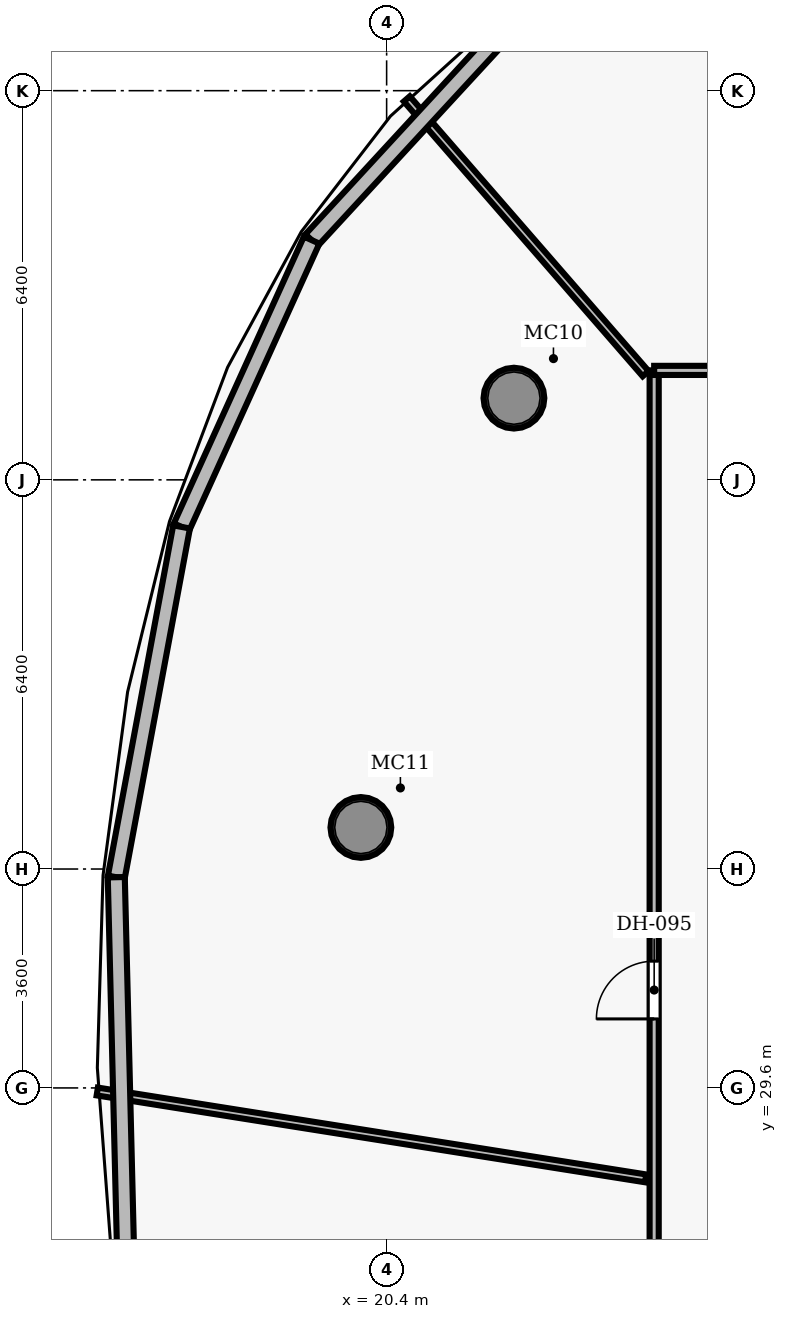
"""IFC4 building model, lengths in metres.
Left out: names, types, materials, properties, quantities, classifications, styles, units other than length and angle.
Written with IfcOpenShell. Run it as: python <this file> out.ifc"""

import sys

from ifc_helpers import new_model, si_unit, direction, frame, frame_2d, origin, origin_2d, place, context, subcontext, project, spatial, rectangle, hollow_circle, extrude, element, fill, save


model = new_model("IFC4")
c1 = context("Model", 3, precision=1e-05, world=origin(), true_north=direction((0.0, 1.0)))
c2 = subcontext(c1, "Body", "Model", "MODEL_VIEW")
j1 = project(units=[si_unit("LENGTHUNIT", "METRE"), si_unit("PLANEANGLEUNIT", "RADIAN")], contexts=[c1])
p1 = place(None, origin())
s1 = spatial("IfcSite", under=j1, at=p1, CompositionType="ELEMENT")
p2 = place(p1, origin())
s2 = spatial("IfcBuilding", under=s1, at=p2, CompositionType="ELEMENT")
p3 = place(p2, frame((0.0, 0.0, 245.9)))
s3 = spatial("IfcBuildingStorey", under=s2, at=p3, CompositionType="ELEMENT", Elevation=245.9)
for number, where, z_axis, x_axis in (
    (1, (22.494, 40.944, 0.0), (0.0, 0.0, 1.0), (1.0, 0.0, 0.0)),
    (2, (19.976, 33.884, 0.0), (0.0, 0.0, 1.0), (1.0, 0.0, 0.0)),
):
    element("IfcColumn", number, at=place(p3, frame(where, z_axis=z_axis, x_axis=x_axis)), inside=s3, PredefinedType="COLUMN", context=c2, shape_type="SweptSolid", body=[
        extrude(hollow_circle(Radius=0.5, WallThickness=0.045, at=origin_2d()), origin(), (0.0, 0.0, 1.0), 3.85),
    ])
p4 = place(p3, frame((24.8, 11.29, 0.0), z_axis=(0.0, 0.0, 1.0), x_axis=(0.0, 1.0, 0.0)))
e3 = element("IfcWall", 3, at=p4, inside=s3, PredefinedType="PARTITIONING", context=c2, shape_type="SweptSolid", body=[
    extrude(rectangle(XDim=30.11, YDim=0.15, at=frame_2d((15.055, 0.0))), origin(), (0.0, 0.0, 1.0), 3.04),
])
p5 = place(p4, frame((19.445, 0.0, 0.0)))
e4 = element("IfcOpeningElement", 4, at=p5, cuts=e3, PredefinedType="OPENING", context=c2, shape_type="SweptSolid", body=[
    extrude(rectangle(XDim=0.95, YDim=2.15, at=frame_2d((0.475, 1.075))), frame((0.0, 0.085, 0.0), z_axis=(0.0, -1.0, 0.0), x_axis=(1.0, 0.0, 0.0)), (0.0, 0.0, 1.0), 0.17),
])
p6 = place(p4, frame((11.011, 0.0, 0.0)))
e5 = element("IfcOpeningElement", 5, at=p6, cuts=e3, PredefinedType="OPENING", context=c2, shape_type="SweptSolid", body=[
    extrude(rectangle(XDim=1.5, YDim=2.2, at=frame_2d((0.75, 1.1))), frame((0.0, 0.085, 0.0), z_axis=(0.0, -1.0, 0.0), x_axis=(1.0, 0.0, 0.0)), (0.0, 0.0, 1.0), 0.17),
])
p7 = place(p3, frame((24.8, 41.4, 0.0), z_axis=(0.0, 0.0, 1.0), x_axis=(1.0, 0.0, 0.0)))
e6 = element("IfcWall", 6, at=p7, inside=s3, PredefinedType="PARTITIONING", context=c2, shape_type="SweptSolid", body=[
    extrude(rectangle(XDim=2.1, YDim=0.15, at=frame_2d((1.05, 0.0))), origin(), (0.0, 0.0, 1.0), 3.04),
])
p8 = place(p3, frame((24.66, 41.346, 0.0), z_axis=(0.0, 0.0, 1.0), x_axis=(-0.656044437945, 0.754722263778, 0.0)))
e7 = element("IfcWall", 7, at=p8, inside=s3, PredefinedType="PARTITIONING", context=c2, shape_type="SweptSolid", body=[
    extrude(rectangle(XDim=5.987, YDim=0.13, at=frame_2d((2.994, 0.0))), origin(), (0.0, 0.0, 1.0), 3.04),
])
p9 = place(p3, frame((24.66, 28.113, 0.0), z_axis=(0.0, 0.0, 1.0), x_axis=(-0.98768784325, 0.156437605123, 0.0)))
e8 = element("IfcWall", 8, at=p9, inside=s3, PredefinedType="PARTITIONING", context=c2, shape_type="SweptSolid", body=[
    extrude(rectangle(XDim=9.131, YDim=0.13, at=frame_2d((4.565, 0.0))), origin(), (0.0, 0.0, 1.0), 3.04),
])
p10 = place(p3, frame((19.167, 43.543, 0.0), z_axis=(0.0, 0.0, 1.0), x_axis=(0.677562449633, 0.735465245166, 0.0)))
e9 = element("IfcWall", 9, at=p10, inside=s3, PredefinedType="SOLIDWALL", context=c2, shape_type="SweptSolid", body=[
    extrude(rectangle(XDim=4.651, YDim=0.28, at=frame_2d((2.325, 0.0))), origin(), (0.0, 0.0, 1.0), 3.625),
])
p11 = place(p3, frame((17.027, 38.826, 0.0), z_axis=(0.0, 0.0, 1.0), x_axis=(0.413028559016, 0.910718073521, 0.0)))
e10 = element("IfcWall", 10, at=p11, inside=s3, PredefinedType="SOLIDWALL", context=c2, shape_type="SweptSolid", body=[
    extrude(rectangle(XDim=5.179, YDim=0.28, at=frame_2d((2.59, 0.0))), origin(), (0.0, 0.0, 1.0), 3.625),
])
p12 = place(p3, frame((15.954, 33.065, 0.0), z_axis=(0.0, 0.0, 1.0), x_axis=(0.183191664763, 0.983077216683, 0.0)))
e11 = element("IfcWall", 11, at=p12, inside=s3, PredefinedType="SOLIDWALL", context=c2, shape_type="SweptSolid", body=[
    extrude(rectangle(XDim=5.86, YDim=0.28, at=frame_2d((2.93, 0.0))), origin(), (0.0, 0.0, 1.0), 3.625),
])
p13 = place(p3, frame((16.111, 26.722, 0.0), z_axis=(0.0, 0.0, 1.0), x_axis=(-0.024778780137, 0.99969295889, 0.0)))
e12 = element("IfcWall", 12, at=p13, inside=s3, PredefinedType="SOLIDWALL", context=c2, shape_type="SweptSolid", body=[
    extrude(rectangle(XDim=6.345, YDim=0.28, at=frame_2d((3.173, 0.0))), origin(), (0.0, 0.0, 1.0), 3.625),
])
p14 = place(p5, origin())
e13 = element("IfcDoor", 13, at=p14, inside=s3, OperationType="SINGLE_SWING_LEFT", PredefinedType="DOOR", context=c2, shape_type="SweptSolid", body=[
    extrude(rectangle(XDim=0.95, YDim=2.15, at=frame_2d((0.475, 1.075))), frame((0.0, 0.025, 0.0), z_axis=(0.0, -1.0, 0.0), x_axis=(1.0, 0.0, 0.0)), (0.0, 0.0, 1.0), 0.05),
])
fill(e4, e13)
save(model, sys.argv[1])
